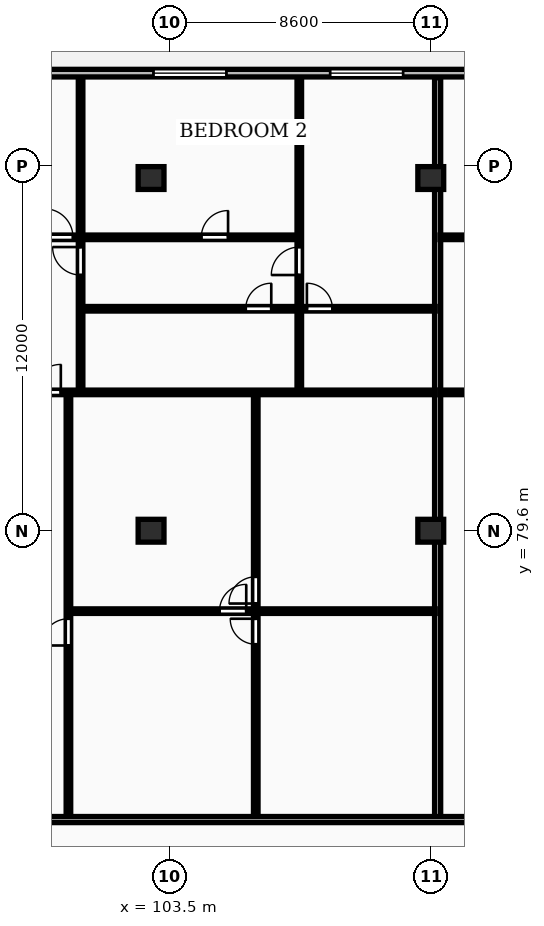
"""IFC4 building model, lengths in metres.
Left out: names, types, materials, properties, quantities, classifications, styles, units other than length and angle.
Written with IfcOpenShell. Run it as: python <this file> out.ifc"""

import sys

from ifc_helpers import new_model, si_unit, direction, frame, frame_2d, origin, origin_2d, place, context, subcontext, project, spatial, rectangle, extrude, element, fill, save


model = new_model("IFC4")
c1 = context("Model", 3, precision=1e-05, world=origin(), true_north=direction((0.0, 1.0)))
c2 = subcontext(c1, "Body", "Model", "MODEL_VIEW")
j1 = project(units=[si_unit("LENGTHUNIT", "METRE"), si_unit("PLANEANGLEUNIT", "RADIAN")], contexts=[c1])
p1 = place(None, origin())
s1 = spatial("IfcSite", under=j1, at=p1, CompositionType="ELEMENT")
p2 = place(p1, origin())
s2 = spatial("IfcBuilding", under=s1, at=p2, CompositionType="ELEMENT")
p3 = place(p2, frame((0.0, 0.0, 201.1)))
s3 = spatial("IfcBuildingStorey", under=s2, at=p3, CompositionType="ELEMENT", Elevation=201.1)
for number, where, z_axis, x_axis in (
    (1, (102.9, 79.6, 0.0), (0.0, 0.0, 1.0), (1.0, 0.0, 0.0)),
    (2, (102.9, 91.2, 0.0), (0.0, 0.0, 1.0), (1.0, 0.0, 0.0)),
    (3, (112.1, 79.6, 0.0), (0.0, 0.0, 1.0), (1.0, 0.0, 0.0)),
    (4, (112.1, 91.2, 0.0), (0.0, 0.0, 1.0), (1.0, 0.0, 0.0)),
):
    element("IfcColumn", number, at=place(p3, frame(where, z_axis=z_axis, x_axis=x_axis)), inside=s3, PredefinedType="COLUMN", context=c2, shape_type="SweptSolid", body=[
        extrude(rectangle(XDim=0.85, YDim=0.75, at=origin_2d()), origin(), (0.0, 0.0, 1.0), 3.25),
    ])
p4 = place(p3, frame((128.4, 94.65, 0.0), z_axis=(0.0, 0.0, 1.0), x_axis=(-1.0, 0.0, 0.0)))
e5 = element("IfcWall", 5, at=p4, inside=s3, PredefinedType="STANDARD", context=c2, shape_type="SweptSolid", body=[
    extrude(rectangle(XDim=68.6, YDim=0.25, at=frame_2d((34.3, 0.0))), origin(), (0.0, 0.0, 1.0), 2.97),
])
p5 = place(p4, frame((63.864, 0.0, 0.0)))
e6 = element("IfcOpeningElement", 6, at=p5, cuts=e5, PredefinedType="OPENING", context=c2, shape_type="SweptSolid", body=[
    extrude(rectangle(XDim=1.8, YDim=2.2, at=frame_2d((0.9, 1.1))), frame((0.0, 0.135, 0.0), z_axis=(0.0, -1.0, 0.0), x_axis=(1.0, 0.0, 0.0)), (0.0, 0.0, 1.0), 0.27),
])
p6 = place(p4, frame((54.713, 0.0, 0.85)))
e7 = element("IfcOpeningElement", 7, at=p6, cuts=e5, PredefinedType="OPENING", context=c2, shape_type="SweptSolid", body=[
    extrude(rectangle(XDim=2.4, YDim=1.9, at=frame_2d((1.2, 0.95))), frame((0.0, 0.135, 0.0), z_axis=(0.0, -1.0, 0.0), x_axis=(1.0, 0.0, 0.0)), (0.0, 0.0, 1.0), 0.27),
])
p7 = place(p4, frame((45.732, 0.0, 0.0)))
e8 = element("IfcOpeningElement", 8, at=p7, cuts=e5, PredefinedType="OPENING", context=c2, shape_type="SweptSolid", body=[
    extrude(rectangle(XDim=1.8, YDim=2.2, at=frame_2d((0.9, 1.1))), frame((0.0, 0.135, 0.0), z_axis=(0.0, -1.0, 0.0), x_axis=(1.0, 0.0, 0.0)), (0.0, 0.0, 1.0), 0.27),
])
p8 = place(p4, frame((36.318, 0.0, 0.85)))
e9 = element("IfcOpeningElement", 9, at=p8, cuts=e5, PredefinedType="OPENING", context=c2, shape_type="SweptSolid", body=[
    extrude(rectangle(XDim=2.4, YDim=1.9, at=frame_2d((1.2, 0.95))), frame((0.0, 0.135, 0.0), z_axis=(0.0, -1.0, 0.0), x_axis=(1.0, 0.0, 0.0)), (0.0, 0.0, 1.0), 0.27),
])
p9 = place(p4, frame((23.021, 0.0, 0.85)))
e10 = element("IfcOpeningElement", 10, at=p9, cuts=e5, PredefinedType="OPENING", context=c2, shape_type="SweptSolid", body=[
    extrude(rectangle(XDim=2.4, YDim=1.9, at=frame_2d((1.2, 0.95))), frame((0.0, 0.135, 0.0), z_axis=(0.0, -1.0, 0.0), x_axis=(1.0, 0.0, 0.0)), (0.0, 0.0, 1.0), 0.27),
])
p10 = place(p4, frame((29.043, 0.0, 0.0)))
e11 = element("IfcOpeningElement", 11, at=p10, cuts=e5, PredefinedType="OPENING", context=c2, shape_type="SweptSolid", body=[
    extrude(rectangle(XDim=1.8, YDim=2.2, at=frame_2d((0.9, 1.1))), frame((0.0, 0.135, 0.0), z_axis=(0.0, -1.0, 0.0), x_axis=(1.0, 0.0, 0.0)), (0.0, 0.0, 1.0), 0.27),
])
p11 = place(p4, frame((17.209, 0.0, 0.85)))
e12 = element("IfcOpeningElement", 12, at=p11, cuts=e5, PredefinedType="OPENING", context=c2, shape_type="SweptSolid", body=[
    extrude(rectangle(XDim=2.4, YDim=1.9, at=frame_2d((1.2, 0.95))), frame((0.0, 0.135, 0.0), z_axis=(0.0, -1.0, 0.0), x_axis=(1.0, 0.0, 0.0)), (0.0, 0.0, 1.0), 0.27),
])
p12 = place(p4, frame((6.712, 0.0, 0.85)))
e13 = element("IfcOpeningElement", 13, at=p12, cuts=e5, PredefinedType="OPENING", context=c2, shape_type="SweptSolid", body=[
    extrude(rectangle(XDim=2.4, YDim=1.9, at=frame_2d((1.2, 0.95))), frame((0.0, 0.135, 0.0), z_axis=(0.0, -1.0, 0.0), x_axis=(1.0, 0.0, 0.0)), (0.0, 0.0, 1.0), 0.27),
])
p13 = place(p4, frame((12.824, 0.0, 0.0)))
e14 = element("IfcOpeningElement", 14, at=p13, cuts=e5, PredefinedType="OPENING", context=c2, shape_type="SweptSolid", body=[
    extrude(rectangle(XDim=1.8, YDim=2.2, at=frame_2d((0.9, 1.1))), frame((0.0, 0.135, 0.0), z_axis=(0.0, -1.0, 0.0), x_axis=(1.0, 0.0, 0.0)), (0.0, 0.0, 1.0), 0.27),
])
p14 = place(p4, frame((1.025, 0.0, 0.85)))
e15 = element("IfcOpeningElement", 15, at=p14, cuts=e5, PredefinedType="OPENING", context=c2, shape_type="SweptSolid", body=[
    extrude(rectangle(XDim=2.4, YDim=1.9, at=frame_2d((1.2, 0.95))), frame((0.0, 0.135, 0.0), z_axis=(0.0, -1.0, 0.0), x_axis=(1.0, 0.0, 0.0)), (0.0, 0.0, 1.0), 0.27),
])
p15 = place(p3, frame((112.326, 70.18, 0.0), z_axis=(0.0, 0.0, 1.0), x_axis=(0.0, 1.0, 0.0)))
e16 = element("IfcWall", 16, at=p15, inside=s3, PredefinedType="PARTITIONING", context=c2, shape_type="SweptSolid", body=[
    extrude(rectangle(XDim=24.32, YDim=0.2, at=frame_2d((12.16, 0.0))), origin(), (0.0, 0.0, 1.0), 2.277),
])
p16 = place(p3, frame((106.344, 70.16, 0.0), z_axis=(0.0, 0.0, 1.0), x_axis=(0.0, 1.0, 0.0)))
e17 = element("IfcWall", 17, at=p16, inside=s3, PredefinedType="PARTITIONING", context=c2, shape_type="SweptSolid", body=[
    extrude(rectangle(XDim=13.95, YDim=0.15, at=frame_2d((6.975, 0.0))), origin(), (0.0, 0.0, 1.0), 2.97),
])
p17 = place(p16, frame((5.705, 0.0, 0.0)))
e18 = element("IfcOpeningElement", 18, at=p17, cuts=e17, PredefinedType="OPENING", context=c2, shape_type="SweptSolid", body=[
    extrude(rectangle(XDim=0.84, YDim=2.04, at=frame_2d((0.42, 1.02))), frame((0.0, 0.085, 0.0), z_axis=(0.0, -1.0, 0.0), x_axis=(1.0, 0.0, 0.0)), (0.0, 0.0, 1.0), 0.17),
])
p18 = place(p16, frame((7.045, 0.0, 0.0)))
e19 = element("IfcOpeningElement", 19, at=p18, cuts=e17, PredefinedType="OPENING", context=c2, shape_type="SweptSolid", body=[
    extrude(rectangle(XDim=0.88, YDim=2.06, at=frame_2d((0.44, 1.03))), frame((0.0, 0.085, 0.0), z_axis=(0.0, -1.0, 0.0), x_axis=(1.0, 0.0, 0.0)), (0.0, 0.0, 1.0), 0.17),
])
p19 = place(p3, frame((100.242, 76.955, 0.0), z_axis=(0.0, 0.0, 1.0), x_axis=(1.0, 0.0, 0.0)))
e20 = element("IfcWall", 20, at=p19, inside=s3, PredefinedType="PARTITIONING", context=c2, shape_type="SweptSolid", body=[
    extrude(rectangle(XDim=12.004, YDim=0.15, at=frame_2d((6.002, 0.0))), origin(), (0.0, 0.0, 1.0), 2.97),
])
p20 = place(p19, frame((4.909, 0.0, 0.0)))
e21 = element("IfcOpeningElement", 21, at=p20, cuts=e20, PredefinedType="OPENING", context=c2, shape_type="SweptSolid", body=[
    extrude(rectangle(XDim=0.88, YDim=2.06, at=frame_2d((0.44, 1.03))), frame((0.0, 0.085, 0.0), z_axis=(0.0, -1.0, 0.0), x_axis=(1.0, 0.0, 0.0)), (0.0, 0.0, 1.0), 0.17),
])
p21 = place(p3, frame((100.182, 70.16, 0.0), z_axis=(0.0, 0.0, 1.0), x_axis=(0.0, 1.0, 0.0)))
e22 = element("IfcWall", 22, at=p21, inside=s3, PredefinedType="PARTITIONING", context=c2, shape_type="SweptSolid", body=[
    extrude(rectangle(XDim=13.95, YDim=0.15, at=frame_2d((6.975, 0.0))), origin(), (0.0, 0.0, 1.0), 2.97),
])
p22 = place(p21, frame((5.665, 0.0, 0.0)))
e23 = element("IfcOpeningElement", 23, at=p22, cuts=e22, PredefinedType="OPENING", context=c2, shape_type="SweptSolid", body=[
    extrude(rectangle(XDim=0.88, YDim=2.06, at=frame_2d((0.44, 1.03))), frame((0.0, 0.085, 0.0), z_axis=(0.0, -1.0, 0.0), x_axis=(1.0, 0.0, 0.0)), (0.0, 0.0, 1.0), 0.17),
])
p23 = place(p3, frame((100.582, 84.19, 0.0), z_axis=(0.0, 0.0, 1.0), x_axis=(0.0, 1.0, 0.0)))
e24 = element("IfcWall", 24, at=p23, inside=s3, PredefinedType="PARTITIONING", context=c2, shape_type="SweptSolid", body=[
    extrude(rectangle(XDim=10.31, YDim=0.15, at=frame_2d((5.155, 0.0))), origin(), (0.0, 0.0, 1.0), 2.97),
])
p24 = place(p23, frame((3.82, 0.0, 0.0)))
e25 = element("IfcOpeningElement", 25, at=p24, cuts=e24, PredefinedType="OPENING", context=c2, shape_type="SweptSolid", body=[
    extrude(rectangle(XDim=0.92, YDim=2.08, at=frame_2d((0.46, 1.04))), frame((0.0, 0.085, 0.0), z_axis=(0.0, -1.0, 0.0), x_axis=(1.0, 0.0, 0.0)), (0.0, 0.0, 1.0), 0.17),
])
p25 = place(p3, frame((107.776, 84.19, 0.0), z_axis=(0.0, 0.0, 1.0), x_axis=(0.0, 1.0, 0.0)))
e26 = element("IfcWall", 26, at=p25, inside=s3, PredefinedType="PARTITIONING", context=c2, shape_type="SweptSolid", body=[
    extrude(rectangle(XDim=2.69, YDim=0.15, at=frame_2d((1.345, 0.0))), origin(), (0.0, 0.0, 1.0), 2.97),
])
p26 = place(p3, frame((107.776, 86.92, 0.0), z_axis=(0.0, 0.0, 1.0), x_axis=(0.0, 1.0, 0.0)))
e27 = element("IfcWall", 27, at=p26, inside=s3, PredefinedType="PARTITIONING", context=c2, shape_type="SweptSolid", body=[
    extrude(rectangle(XDim=7.58, YDim=0.15, at=frame_2d((3.79, 0.0))), origin(), (0.0, 0.0, 1.0), 2.97),
])
p27 = place(p26, frame((1.09, 0.0, 0.0)))
e28 = element("IfcOpeningElement", 28, at=p27, cuts=e27, PredefinedType="OPENING", context=c2, shape_type="SweptSolid", body=[
    extrude(rectangle(XDim=0.92, YDim=2.08, at=frame_2d((0.46, 1.04))), frame((0.0, 0.085, 0.0), z_axis=(0.0, -1.0, 0.0), x_axis=(1.0, 0.0, 0.0)), (0.0, 0.0, 1.0), 0.17),
])
p28 = place(p3, frame((100.622, 86.9, 0.0), z_axis=(0.0, 0.0, 1.0), x_axis=(1.0, 0.0, 0.0)))
e29 = element("IfcWall", 29, at=p28, inside=s3, PredefinedType="PARTITIONING", context=c2, shape_type="SweptSolid", body=[
    extrude(rectangle(XDim=11.624, YDim=0.15, at=frame_2d((5.812, 0.0))), origin(), (0.0, 0.0, 1.0), 2.97),
])
p29 = place(p28, frame((5.392, 0.0, 0.0)))
e30 = element("IfcOpeningElement", 30, at=p29, cuts=e29, PredefinedType="OPENING", context=c2, shape_type="SweptSolid", body=[
    extrude(rectangle(XDim=0.84, YDim=2.04, at=frame_2d((0.42, 1.02))), frame((0.0, 0.085, 0.0), z_axis=(0.0, -1.0, 0.0), x_axis=(1.0, 0.0, 0.0)), (0.0, 0.0, 1.0), 0.17),
])
p30 = place(p28, frame((7.404, 0.0, 0.0)))
e31 = element("IfcOpeningElement", 31, at=p30, cuts=e29, PredefinedType="OPENING", context=c2, shape_type="SweptSolid", body=[
    extrude(rectangle(XDim=0.84, YDim=2.04, at=frame_2d((0.42, 1.02))), frame((0.0, 0.085, 0.0), z_axis=(0.0, -1.0, 0.0), x_axis=(1.0, 0.0, 0.0)), (0.0, 0.0, 1.0), 0.17),
])
p31 = place(p3, frame((96.292, 84.15, 0.0), z_axis=(0.0, 0.0, 1.0), x_axis=(1.0, 0.0, 0.0)))
e32 = element("IfcWall", 32, at=p31, inside=s3, PredefinedType="PARTITIONING", context=c2, shape_type="SweptSolid", body=[
    extrude(rectangle(XDim=15.954, YDim=0.15, at=frame_2d((7.977, 0.0))), origin(), (0.0, 0.0, 1.0), 2.97),
])
p32 = place(p31, frame((2.72, 0.0, 0.0)))
e33 = element("IfcOpeningElement", 33, at=p32, cuts=e32, PredefinedType="OPENING", context=c2, shape_type="SweptSolid", body=[
    extrude(rectangle(XDim=0.92, YDim=2.08, at=frame_2d((0.46, 1.04))), frame((0.0, 0.085, 0.0), z_axis=(0.0, -1.0, 0.0), x_axis=(1.0, 0.0, 0.0)), (0.0, 0.0, 1.0), 0.17),
])
p33 = place(p3, frame((96.292, 89.25, 0.0), z_axis=(0.0, 0.0, 1.0), x_axis=(1.0, 0.0, 0.0)))
e34 = element("IfcWall", 34, at=p33, inside=s3, PredefinedType="PARTITIONING", context=c2, shape_type="SweptSolid", body=[
    extrude(rectangle(XDim=11.484, YDim=0.15, at=frame_2d((5.742, 0.0))), origin(), (0.0, 0.0, 1.0), 2.97),
])
p34 = place(p33, frame((3.1, 0.0, 0.0)))
e35 = element("IfcOpeningElement", 35, at=p34, cuts=e34, PredefinedType="OPENING", context=c2, shape_type="SweptSolid", body=[
    extrude(rectangle(XDim=0.94, YDim=2.1, at=frame_2d((0.47, 1.05))), frame((0.0, 0.085, 0.0), z_axis=(0.0, -1.0, 0.0), x_axis=(1.0, 0.0, 0.0)), (0.0, 0.0, 1.0), 0.17),
])
p35 = place(p33, frame((8.261, 0.0, 0.0)))
e36 = element("IfcOpeningElement", 36, at=p35, cuts=e34, PredefinedType="OPENING", context=c2, shape_type="SweptSolid", body=[
    extrude(rectangle(XDim=0.88, YDim=2.06, at=frame_2d((0.44, 1.03))), frame((0.0, 0.085, 0.0), z_axis=(0.0, -1.0, 0.0), x_axis=(1.0, 0.0, 0.0)), (0.0, 0.0, 1.0), 0.17),
])
p36 = place(p3, frame((112.406, 84.15, 0.0), z_axis=(0.0, 0.0, 1.0), x_axis=(1.0, 0.0, 0.0)))
e37 = element("IfcWall", 37, at=p36, inside=s3, PredefinedType="PARTITIONING", context=c2, shape_type="SweptSolid", body=[
    extrude(rectangle(XDim=15.915, YDim=0.15, at=frame_2d((7.957, 0.0))), origin(), (0.0, 0.0, 1.0), 2.97),
])
p37 = place(p36, frame((2.72, 0.0, 0.0)))
e38 = element("IfcOpeningElement", 38, at=p37, cuts=e37, PredefinedType="OPENING", context=c2, shape_type="SweptSolid", body=[
    extrude(rectangle(XDim=0.92, YDim=2.08, at=frame_2d((0.46, 1.04))), frame((0.0, 0.085, 0.0), z_axis=(0.0, -1.0, 0.0), x_axis=(1.0, 0.0, 0.0)), (0.0, 0.0, 1.0), 0.17),
])
p38 = place(p3, frame((112.406, 89.25, 0.0), z_axis=(0.0, 0.0, 1.0), x_axis=(1.0, 0.0, 0.0)))
e39 = element("IfcWall", 39, at=p38, inside=s3, PredefinedType="PARTITIONING", context=c2, shape_type="SweptSolid", body=[
    extrude(rectangle(XDim=11.665, YDim=0.15, at=frame_2d((5.832, 0.0))), origin(), (0.0, 0.0, 1.0), 2.97),
])
p39 = place(p38, frame((3.31, 0.0, 0.0)))
e40 = element("IfcOpeningElement", 40, at=p39, cuts=e39, PredefinedType="OPENING", context=c2, shape_type="SweptSolid", body=[
    extrude(rectangle(XDim=0.94, YDim=2.1, at=frame_2d((0.47, 1.05))), frame((0.0, 0.085, 0.0), z_axis=(0.0, -1.0, 0.0), x_axis=(1.0, 0.0, 0.0)), (0.0, 0.0, 1.0), 0.17),
])
p40 = place(p38, frame((5.392, 0.0, 0.0)))
e41 = element("IfcOpeningElement", 41, at=p40, cuts=e39, PredefinedType="OPENING", context=c2, shape_type="SweptSolid", body=[
    extrude(rectangle(XDim=0.88, YDim=2.06, at=frame_2d((0.44, 1.03))), frame((0.0, 0.085, 0.0), z_axis=(0.0, -1.0, 0.0), x_axis=(1.0, 0.0, 0.0)), (0.0, 0.0, 1.0), 0.17),
])
p41 = place(p3, frame((59.8, 70.1, 0.0), z_axis=(0.0, 0.0, 1.0), x_axis=(1.0, 0.0, 0.0)))
e42 = element("IfcWall", 42, at=p41, inside=s3, PredefinedType="PARTITIONING", context=c2, shape_type="SweptSolid", body=[
    extrude(rectangle(XDim=68.6, YDim=0.2, at=frame_2d((34.3, 0.0))), origin(), (0.0, 0.0, 1.0), 2.97),
])
p42 = place(p41, frame((7.281, 0.0, 0.0)))
e43 = element("IfcOpeningElement", 43, at=p42, cuts=e42, PredefinedType="OPENING", context=c2, shape_type="SweptSolid", body=[
    extrude(rectangle(XDim=1.22, YDim=2.18, at=frame_2d((0.61, 1.09))), frame((0.0, 0.11, 0.0), z_axis=(0.0, -1.0, 0.0), x_axis=(1.0, 0.0, 0.0)), (0.0, 0.0, 1.0), 0.22),
])
p43 = place(p41, frame((25.602, 0.0, 0.0)))
e44 = element("IfcOpeningElement", 44, at=p43, cuts=e42, PredefinedType="OPENING", context=c2, shape_type="SweptSolid", body=[
    extrude(rectangle(XDim=1.22, YDim=2.18, at=frame_2d((0.61, 1.09))), frame((0.0, 0.11, 0.0), z_axis=(0.0, -1.0, 0.0), x_axis=(1.0, 0.0, 0.0)), (0.0, 0.0, 1.0), 0.22),
])
p44 = place(p41, frame((38.457, 0.0, 0.0)))
e45 = element("IfcOpeningElement", 45, at=p44, cuts=e42, PredefinedType="OPENING", context=c2, shape_type="SweptSolid", body=[
    extrude(rectangle(XDim=0.95, YDim=2.15, at=frame_2d((0.475, 1.075))), frame((0.0, 0.11, 0.0), z_axis=(0.0, -1.0, 0.0), x_axis=(1.0, 0.0, 0.0)), (0.0, 0.0, 1.0), 0.22),
])
p45 = place(p41, frame((54.571, 0.0, 0.0)))
e46 = element("IfcOpeningElement", 46, at=p45, cuts=e42, PredefinedType="OPENING", context=c2, shape_type="SweptSolid", body=[
    extrude(rectangle(XDim=0.95, YDim=2.15, at=frame_2d((0.475, 1.075))), frame((0.0, 0.11, 0.0), z_axis=(0.0, -1.0, 0.0), x_axis=(1.0, 0.0, 0.0)), (0.0, 0.0, 1.0), 0.22),
])
p46 = place(p9, origin())
e47 = element("IfcWindow", 47, at=p46, inside=s3, PartitioningType="DOUBLE_PANEL_VERTICAL", PredefinedType="WINDOW", context=c2, shape_type="SweptSolid", body=[
    extrude(rectangle(XDim=2.4, YDim=1.9, at=frame_2d((1.2, 0.95))), frame((0.0, 0.03, 0.0), z_axis=(0.0, -1.0, 0.0), x_axis=(1.0, 0.0, 0.0)), (0.0, 0.0, 1.0), 0.06),
])
fill(e10, e47)
p47 = place(p11, origin())
e48 = element("IfcWindow", 48, at=p47, inside=s3, PartitioningType="DOUBLE_PANEL_VERTICAL", PredefinedType="WINDOW", context=c2, shape_type="SweptSolid", body=[
    extrude(rectangle(XDim=2.4, YDim=1.9, at=frame_2d((1.2, 0.95))), frame((0.0, 0.03, 0.0), z_axis=(0.0, -1.0, 0.0), x_axis=(1.0, 0.0, 0.0)), (0.0, 0.0, 1.0), 0.06),
])
fill(e12, e48)
p48 = place(p17, origin())
e49 = element("IfcDoor", 49, at=p48, inside=s3, OperationType="SINGLE_SWING_RIGHT", PredefinedType="DOOR", context=c2, shape_type="SweptSolid", body=[
    extrude(rectangle(XDim=0.84, YDim=2.04, at=frame_2d((0.42, 1.02))), frame((0.0, 0.025, 0.0), z_axis=(0.0, -1.0, 0.0), x_axis=(1.0, 0.0, 0.0)), (0.0, 0.0, 1.0), 0.05),
])
fill(e18, e49)
p49 = place(p18, origin())
e50 = element("IfcDoor", 50, at=p49, inside=s3, OperationType="SINGLE_SWING_LEFT", PredefinedType="DOOR", context=c2, shape_type="SweptSolid", body=[
    extrude(rectangle(XDim=0.88, YDim=2.06, at=frame_2d((0.44, 1.03))), frame((0.0, 0.025, 0.0), z_axis=(0.0, -1.0, 0.0), x_axis=(1.0, 0.0, 0.0)), (0.0, 0.0, 1.0), 0.05),
])
fill(e19, e50)
p50 = place(p20, origin())
e51 = element("IfcDoor", 51, at=p50, inside=s3, OperationType="SINGLE_SWING_RIGHT", PredefinedType="DOOR", context=c2, shape_type="SweptSolid", body=[
    extrude(rectangle(XDim=0.88, YDim=2.06, at=frame_2d((0.44, 1.03))), frame((0.0, 0.025, 0.0), z_axis=(0.0, -1.0, 0.0), x_axis=(1.0, 0.0, 0.0)), (0.0, 0.0, 1.0), 0.05),
])
fill(e21, e51)
p51 = place(p22, origin())
e52 = element("IfcDoor", 52, at=p51, inside=s3, OperationType="SINGLE_SWING_LEFT", PredefinedType="DOOR", context=c2, shape_type="SweptSolid", body=[
    extrude(rectangle(XDim=0.88, YDim=2.06, at=frame_2d((0.44, 1.03))), frame((0.0, 0.025, 0.0), z_axis=(0.0, -1.0, 0.0), x_axis=(1.0, 0.0, 0.0)), (0.0, 0.0, 1.0), 0.05),
])
fill(e23, e52)
p52 = place(p24, origin())
e53 = element("IfcDoor", 53, at=p52, inside=s3, OperationType="SINGLE_SWING_RIGHT", PredefinedType="DOOR", context=c2, shape_type="SweptSolid", body=[
    extrude(rectangle(XDim=0.92, YDim=2.08, at=frame_2d((0.46, 1.04))), frame((0.0, 0.025, 0.0), z_axis=(0.0, -1.0, 0.0), x_axis=(1.0, 0.0, 0.0)), (0.0, 0.0, 1.0), 0.05),
])
fill(e25, e53)
p53 = place(p27, origin())
e54 = element("IfcDoor", 54, at=p53, inside=s3, OperationType="SINGLE_SWING_LEFT", PredefinedType="DOOR", context=c2, shape_type="SweptSolid", body=[
    extrude(rectangle(XDim=0.92, YDim=2.08, at=frame_2d((0.46, 1.04))), frame((0.0, 0.025, 0.0), z_axis=(0.0, -1.0, 0.0), x_axis=(1.0, 0.0, 0.0)), (0.0, 0.0, 1.0), 0.05),
])
fill(e28, e54)
p54 = place(p29, origin())
e55 = element("IfcDoor", 55, at=p54, inside=s3, OperationType="SINGLE_SWING_RIGHT", PredefinedType="DOOR", context=c2, shape_type="SweptSolid", body=[
    extrude(rectangle(XDim=0.84, YDim=2.04, at=frame_2d((0.42, 1.02))), frame((0.0, 0.025, 0.0), z_axis=(0.0, -1.0, 0.0), x_axis=(1.0, 0.0, 0.0)), (0.0, 0.0, 1.0), 0.05),
])
fill(e30, e55)
p55 = place(p30, origin())
e56 = element("IfcDoor", 56, at=p55, inside=s3, OperationType="SINGLE_SWING_LEFT", PredefinedType="DOOR", context=c2, shape_type="SweptSolid", body=[
    extrude(rectangle(XDim=0.84, YDim=2.04, at=frame_2d((0.42, 1.02))), frame((0.0, 0.025, 0.0), z_axis=(0.0, -1.0, 0.0), x_axis=(1.0, 0.0, 0.0)), (0.0, 0.0, 1.0), 0.05),
])
fill(e31, e56)
p56 = place(p32, origin())
e57 = element("IfcDoor", 57, at=p56, inside=s3, OperationType="SINGLE_SWING_RIGHT", PredefinedType="DOOR", context=c2, shape_type="SweptSolid", body=[
    extrude(rectangle(XDim=0.92, YDim=2.08, at=frame_2d((0.46, 1.04))), frame((0.0, 0.025, 0.0), z_axis=(0.0, -1.0, 0.0), x_axis=(1.0, 0.0, 0.0)), (0.0, 0.0, 1.0), 0.05),
])
fill(e33, e57)
p57 = place(p34, origin())
e58 = element("IfcDoor", 58, at=p57, inside=s3, OperationType="SINGLE_SWING_LEFT", PredefinedType="DOOR", context=c2, shape_type="SweptSolid", body=[
    extrude(rectangle(XDim=0.94, YDim=2.1, at=frame_2d((0.47, 1.05))), frame((0.0, 0.025, 0.0), z_axis=(0.0, -1.0, 0.0), x_axis=(1.0, 0.0, 0.0)), (0.0, 0.0, 1.0), 0.05),
])
fill(e35, e58)
p58 = place(p35, origin())
e59 = element("IfcDoor", 59, at=p58, inside=s3, OperationType="SINGLE_SWING_RIGHT", PredefinedType="DOOR", context=c2, shape_type="SweptSolid", body=[
    extrude(rectangle(XDim=0.88, YDim=2.06, at=frame_2d((0.44, 1.03))), frame((0.0, 0.025, 0.0), z_axis=(0.0, -1.0, 0.0), x_axis=(1.0, 0.0, 0.0)), (0.0, 0.0, 1.0), 0.05),
])
fill(e36, e59)
save(model, sys.argv[1])
